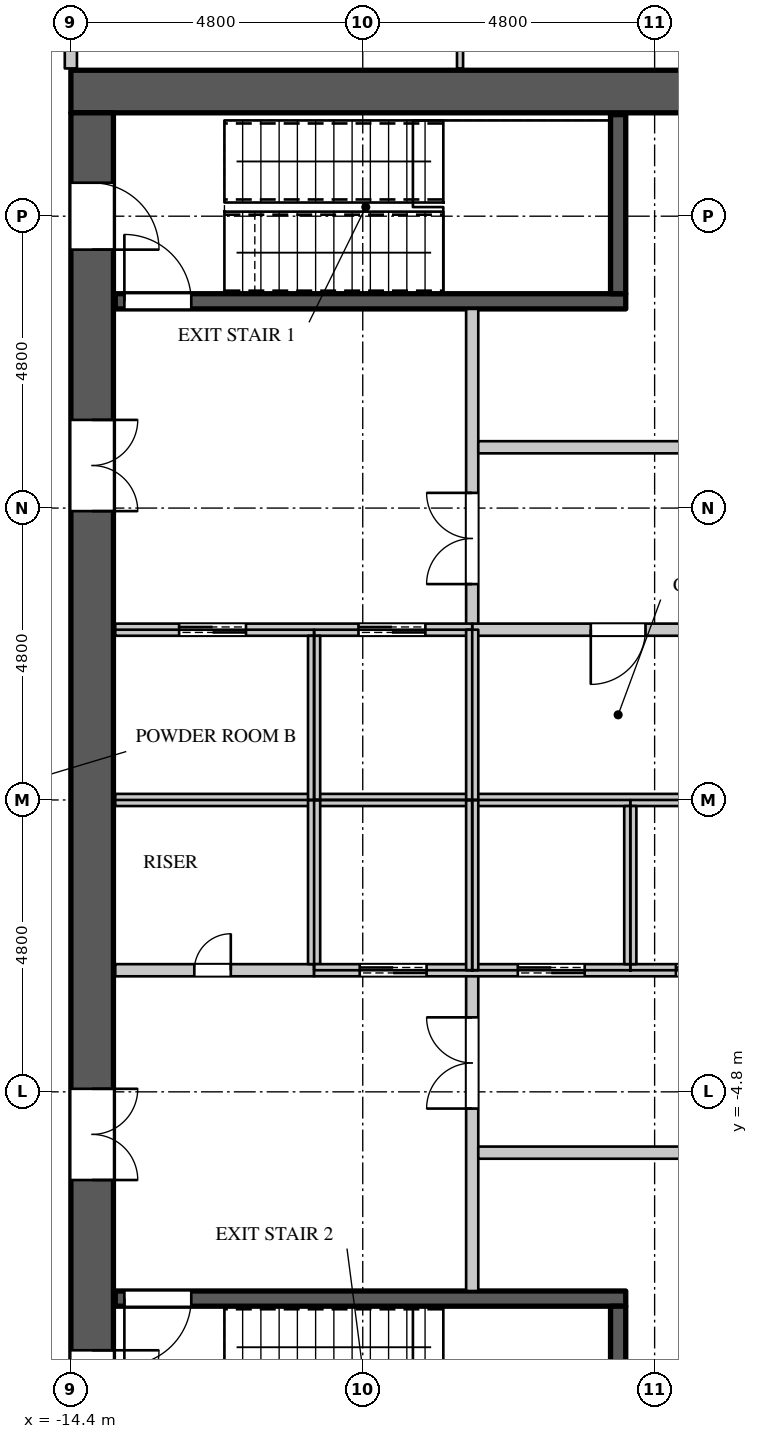
"""IFC4 building model, lengths in metres.
Left out: names, types, materials, properties, quantities, classifications, styles, units other than length and angle.
Written with IfcOpenShell. Run it as: python <this file> out.ifc"""

import sys

from ifc_helpers import new_model, si_unit, direction, frame, frame_2d, origin, place, context, subcontext, project, spatial, rectangle, extrude, element, fill, save


model = new_model("IFC4")
c1 = context("Model", 3, precision=1e-05, world=origin(), true_north=direction((0.0, 1.0)))
c2 = subcontext(c1, "Body", "Model", "MODEL_VIEW")
j1 = project(units=[si_unit("LENGTHUNIT", "METRE"), si_unit("PLANEANGLEUNIT", "RADIAN")], contexts=[c1])
p1 = place(None, origin())
s1 = spatial("IfcSite", under=j1, at=p1, CompositionType="ELEMENT")
p2 = place(p1, origin())
s2 = spatial("IfcBuilding", under=s1, at=p2, CompositionType="ELEMENT")
p3 = place(p2, frame((0.0, 0.0, 187.5)))
s3 = spatial("IfcBuildingStorey", under=s2, at=p3, CompositionType="ELEMENT", Elevation=187.5)
p4 = place(p3, frame((-14.4, 11.65, 0.0), z_axis=(0.0, 0.0, 1.0), x_axis=(1.0, 0.0, 0.0)))
e1 = element("IfcWall", 1, at=p4, inside=s3, PredefinedType="SHEAR", context=c2, shape_type="SweptSolid", body=[
    extrude(rectangle(XDim=28.8, YDim=0.7, at=frame_2d((14.4, 0.0))), origin(), (0.0, 0.0, 1.0), 4.2),
])
p5 = place(p3, frame((-14.05, -11.3, 0.0), z_axis=(0.0, 0.0, 1.0), x_axis=(0.0, 1.0, 0.0)))
e2 = element("IfcWall", 2, at=p5, inside=s3, PredefinedType="SHEAR", context=c2, shape_type="SweptSolid", body=[
    extrude(rectangle(XDim=22.6, YDim=0.7, at=frame_2d((11.3, 0.0))), origin(), (0.0, 0.0, 1.0), 4.2),
])
p6 = place(p5, frame((20.35, 0.0, 0.0)))
e3 = element("IfcOpeningElement", 3, at=p6, cuts=e2, PredefinedType="OPENING", context=c2, shape_type="SweptSolid", body=[
    extrude(rectangle(XDim=1.1, YDim=2.2, at=frame_2d((0.55, 1.1))), frame((0.0, 0.36, 0.0), z_axis=(0.0, -1.0, 0.0), x_axis=(1.0, 0.0, 0.0)), (0.0, 0.0, 1.0), 0.72),
])
p7 = place(p5, frame((1.15, 0.0, 0.0)))
e4 = element("IfcOpeningElement", 4, at=p7, cuts=e2, PredefinedType="OPENING", context=c2, shape_type="SweptSolid", body=[
    extrude(rectangle(XDim=1.1, YDim=2.2, at=frame_2d((0.55, 1.1))), frame((0.0, 0.36, 0.0), z_axis=(0.0, -1.0, 0.0), x_axis=(1.0, 0.0, 0.0)), (0.0, 0.0, 1.0), 0.72),
])
p8 = place(p5, frame((16.05, 0.0, 0.0)))
e5 = element("IfcOpeningElement", 5, at=p8, cuts=e2, PredefinedType="OPENING", context=c2, shape_type="SweptSolid", body=[
    extrude(rectangle(XDim=1.5, YDim=2.4, at=frame_2d((0.75, 1.2))), frame((0.0, 0.36, 0.0), z_axis=(0.0, -1.0, 0.0), x_axis=(1.0, 0.0, 0.0)), (0.0, 0.0, 1.0), 0.72),
])
p9 = place(p5, frame((5.05, 0.0, 0.0)))
e6 = element("IfcOpeningElement", 6, at=p9, cuts=e2, PredefinedType="OPENING", context=c2, shape_type="SweptSolid", body=[
    extrude(rectangle(XDim=1.5, YDim=2.4, at=frame_2d((0.75, 1.2))), frame((0.0, 0.36, 0.0), z_axis=(0.0, -1.0, 0.0), x_axis=(1.0, 0.0, 0.0)), (0.0, 0.0, 1.0), 0.72),
])
p10 = place(p3, frame((-14.4, 12.03, 0.0), z_axis=(0.0, 0.0, 1.0), x_axis=(0.0, 1.0, 0.0)))
e7 = element("IfcWall", 7, at=p10, inside=s3, PredefinedType="PARTITIONING", context=c2, shape_type="SweptSolid", body=[
    extrude(rectangle(XDim=2.27, YDim=0.2, at=frame_2d((1.135, 0.0))), origin(), (0.0, 0.0, 1.0), 3.95),
])
p11 = place(p3, frame((-7.8, -8.075, 0.0), z_axis=(0.0, 0.0, 1.0), x_axis=(0.0, 1.0, 0.0)))
e8 = element("IfcWall", 8, at=p11, inside=s3, PredefinedType="PARTITIONING", context=c2, shape_type="SweptSolid", body=[
    extrude(rectangle(XDim=5.275, YDim=0.2, at=frame_2d((2.637, 0.0))), origin(), (0.0, 0.0, 1.0), 3.95),
])
p12 = place(p11, frame((3.0, 0.0, 0.0)))
e9 = element("IfcOpeningElement", 9, at=p12, cuts=e8, PredefinedType="OPENING", context=c2, shape_type="SweptSolid", body=[
    extrude(rectangle(XDim=1.5, YDim=2.4, at=frame_2d((0.75, 1.2))), frame((0.0, 0.11, 0.0), z_axis=(0.0, -1.0, 0.0), x_axis=(1.0, 0.0, 0.0)), (0.0, 0.0, 1.0), 0.22),
])
p13 = place(p3, frame((-7.7, -5.8, 0.0), z_axis=(0.0, 0.0, 1.0), x_axis=(1.0, 0.0, 0.0)))
e10 = element("IfcWall", 10, at=p13, inside=s3, PredefinedType="PARTITIONING", context=c2, shape_type="SweptSolid", body=[
    extrude(rectangle(XDim=21.37, YDim=0.2, at=frame_2d((10.685, 0.0))), origin(), (0.0, 0.0, 1.0), 3.95),
])
p14 = place(p13, frame((5.35, 0.0, 0.0)))
e11 = element("IfcOpeningElement", 11, at=p14, cuts=e10, PredefinedType="OPENING", context=c2, shape_type="SweptSolid", body=[
    extrude(rectangle(XDim=0.9, YDim=2.2, at=frame_2d((0.45, 1.1))), frame((0.0, 0.11, 0.0), z_axis=(0.0, -1.0, 0.0), x_axis=(1.0, 0.0, 0.0)), (0.0, 0.0, 1.0), 0.22),
])
p15 = place(p13, frame((15.9, 0.0, 0.0)))
e12 = element("IfcOpeningElement", 12, at=p15, cuts=e10, PredefinedType="OPENING", context=c2, shape_type="SweptSolid", body=[
    extrude(rectangle(XDim=0.9, YDim=2.2, at=frame_2d((0.45, 1.1))), frame((0.0, 0.11, 0.0), z_axis=(0.0, -1.0, 0.0), x_axis=(1.0, 0.0, 0.0)), (0.0, 0.0, 1.0), 0.22),
])
p16 = place(p3, frame((-7.8, 2.8, 0.0), z_axis=(0.0, 0.0, 1.0), x_axis=(0.0, 1.0, 0.0)))
e13 = element("IfcWall", 13, at=p16, inside=s3, PredefinedType="PARTITIONING", context=c2, shape_type="SweptSolid", body=[
    extrude(rectangle(XDim=5.275, YDim=0.2, at=frame_2d((2.637, 0.0))), origin(), (0.0, 0.0, 1.0), 3.95),
])
p17 = place(p16, frame((0.75, 0.0, 0.0)))
e14 = element("IfcOpeningElement", 14, at=p17, cuts=e13, PredefinedType="OPENING", context=c2, shape_type="SweptSolid", body=[
    extrude(rectangle(XDim=1.5, YDim=2.4, at=frame_2d((0.75, 1.2))), frame((0.0, 0.11, 0.0), z_axis=(0.0, -1.0, 0.0), x_axis=(1.0, 0.0, 0.0)), (0.0, 0.0, 1.0), 0.22),
])
p18 = place(p3, frame((-7.7, 5.8, 0.0), z_axis=(0.0, 0.0, 1.0), x_axis=(1.0, 0.0, 0.0)))
e15 = element("IfcWall", 15, at=p18, inside=s3, PredefinedType="PARTITIONING", context=c2, shape_type="SweptSolid", body=[
    extrude(rectangle(XDim=8.12, YDim=0.2, at=frame_2d((4.06, 0.0))), origin(), (0.0, 0.0, 1.0), 3.95),
])
p19 = place(p18, frame((3.6, 0.0, 0.0)))
e16 = element("IfcOpeningElement", 16, at=p19, cuts=e15, PredefinedType="OPENING", context=c2, shape_type="SweptSolid", body=[
    extrude(rectangle(XDim=0.9, YDim=2.2, at=frame_2d((0.45, 1.1))), frame((0.0, 0.11, 0.0), z_axis=(0.0, -1.0, 0.0), x_axis=(1.0, 0.0, 0.0)), (0.0, 0.0, 1.0), 0.22),
])
p20 = place(p3, frame((-13.67, -2.8, 0.0), z_axis=(0.0, 0.0, 1.0), x_axis=(1.0, 0.0, 0.0)))
e17 = element("IfcWall", 17, at=p20, inside=s3, PredefinedType="PARTITIONING", context=c2, shape_type="SweptSolid", body=[
    extrude(rectangle(XDim=3.27, YDim=0.2, at=frame_2d((1.635, 0.0))), origin(), (0.0, 0.0, 1.0), 3.95),
])
p21 = place(p20, frame((1.3, 0.0, 0.0)))
e18 = element("IfcOpeningElement", 18, at=p21, cuts=e17, PredefinedType="OPENING", context=c2, shape_type="SweptSolid", body=[
    extrude(rectangle(XDim=0.6, YDim=2.0, at=frame_2d((0.3, 1.0))), frame((0.0, 0.11, 0.0), z_axis=(0.0, -1.0, 0.0), x_axis=(1.0, 0.0, 0.0)), (0.0, 0.0, 1.0), 0.22),
])
p22 = place(p3, frame((-7.8, 2.8, 0.0), z_axis=(0.0, 0.0, 1.0), x_axis=(1.0, 0.0, 0.0)))
e19 = element("IfcWall", 19, at=p22, inside=s3, PredefinedType="PARTITIONING", context=c2, shape_type="SweptSolid", body=[
    extrude(rectangle(XDim=4.82, YDim=0.2, at=frame_2d((2.41, 0.0))), origin(), (0.0, 0.0, 1.0), 3.95),
])
p23 = place(p22, frame((1.95, 0.0, 0.0)))
e20 = element("IfcOpeningElement", 20, at=p23, cuts=e19, PredefinedType="OPENING", context=c2, shape_type="SweptSolid", body=[
    extrude(rectangle(XDim=0.9, YDim=2.2, at=frame_2d((0.45, 1.1))), frame((0.0, 0.11, 0.0), z_axis=(0.0, -1.0, 0.0), x_axis=(1.0, 0.0, 0.0)), (0.0, 0.0, 1.0), 0.22),
])
p24 = place(p3, frame((-13.67, 0.0, 0.0), z_axis=(0.0, 0.0, 1.0), x_axis=(1.0, 0.0, 0.0)))
e21 = element("IfcWall", 21, at=p24, inside=s3, PredefinedType="PARTITIONING", context=c2, shape_type="SweptSolid", body=[
    extrude(rectangle(XDim=21.47, YDim=0.2, at=frame_2d((10.735, 0.0))), origin(), (0.0, 0.0, 1.0), 3.95),
])
p25 = place(p3, frame((-13.67, 2.8, 0.0), z_axis=(0.0, 0.0, 1.0), x_axis=(1.0, 0.0, 0.0)))
e22 = element("IfcWall", 22, at=p25, inside=s3, PredefinedType="PARTITIONING", context=c2, shape_type="SweptSolid", body=[
    extrude(rectangle(XDim=5.87, YDim=0.2, at=frame_2d((2.935, 0.0))), origin(), (0.0, 0.0, 1.0), 3.95),
])
p26 = place(p25, frame((1.05, 0.0, 0.0)))
e23 = element("IfcOpeningElement", 23, at=p26, cuts=e22, PredefinedType="OPENING", context=c2, shape_type="SweptSolid", body=[
    extrude(rectangle(XDim=1.1, YDim=2.2, at=frame_2d((0.55, 1.1))), frame((0.0, 0.11, 0.0), z_axis=(0.0, -1.0, 0.0), x_axis=(1.0, 0.0, 0.0)), (0.0, 0.0, 1.0), 0.22),
])
p27 = place(p25, frame((4.0, 0.0, 0.0)))
e24 = element("IfcOpeningElement", 24, at=p27, cuts=e22, PredefinedType="OPENING", context=c2, shape_type="SweptSolid", body=[
    extrude(rectangle(XDim=1.1, YDim=2.2, at=frame_2d((0.55, 1.1))), frame((0.0, 0.11, 0.0), z_axis=(0.0, -1.0, 0.0), x_axis=(1.0, 0.0, 0.0)), (0.0, 0.0, 1.0), 0.22),
])
p28 = place(p3, frame((-10.4, -2.7, 0.0), z_axis=(0.0, 0.0, 1.0), x_axis=(0.0, 1.0, 0.0)))
e25 = element("IfcWall", 25, at=p28, inside=s3, PredefinedType="PARTITIONING", context=c2, shape_type="SweptSolid", body=[
    extrude(rectangle(XDim=2.7, YDim=0.2, at=frame_2d((1.35, 0.0))), origin(), (0.0, 0.0, 1.0), 3.95),
])
p29 = place(p3, frame((-10.4, -2.8, 0.0), z_axis=(0.0, 0.0, 1.0), x_axis=(1.0, 0.0, 0.0)))
e26 = element("IfcWall", 26, at=p29, inside=s3, PredefinedType="PARTITIONING", context=c2, shape_type="SweptSolid", body=[
    extrude(rectangle(XDim=18.2, YDim=0.2, at=frame_2d((9.1, 0.0))), origin(), (0.0, 0.0, 1.0), 3.95),
])
p30 = place(p29, frame((0.75, 0.0, 0.0)))
e27 = element("IfcOpeningElement", 27, at=p30, cuts=e26, PredefinedType="OPENING", context=c2, shape_type="SweptSolid", body=[
    extrude(rectangle(XDim=1.1, YDim=2.2, at=frame_2d((0.55, 1.1))), frame((0.0, 0.11, 0.0), z_axis=(0.0, -1.0, 0.0), x_axis=(1.0, 0.0, 0.0)), (0.0, 0.0, 1.0), 0.22),
])
p31 = place(p29, frame((3.35, 0.0, 0.0)))
e28 = element("IfcOpeningElement", 28, at=p31, cuts=e26, PredefinedType="OPENING", context=c2, shape_type="SweptSolid", body=[
    extrude(rectangle(XDim=1.1, YDim=2.2, at=frame_2d((0.55, 1.1))), frame((0.0, 0.11, 0.0), z_axis=(0.0, -1.0, 0.0), x_axis=(1.0, 0.0, 0.0)), (0.0, 0.0, 1.0), 0.22),
])
p32 = place(p29, frame((5.95, 0.0, 0.0)))
e29 = element("IfcOpeningElement", 29, at=p32, cuts=e26, PredefinedType="OPENING", context=c2, shape_type="SweptSolid", body=[
    extrude(rectangle(XDim=1.1, YDim=2.2, at=frame_2d((0.55, 1.1))), frame((0.0, 0.11, 0.0), z_axis=(0.0, -1.0, 0.0), x_axis=(1.0, 0.0, 0.0)), (0.0, 0.0, 1.0), 0.22),
])
p33 = place(p29, frame((8.55, 0.0, 0.0)))
e30 = element("IfcOpeningElement", 30, at=p33, cuts=e26, PredefinedType="OPENING", context=c2, shape_type="SweptSolid", body=[
    extrude(rectangle(XDim=1.1, YDim=2.2, at=frame_2d((0.55, 1.1))), frame((0.0, 0.11, 0.0), z_axis=(0.0, -1.0, 0.0), x_axis=(1.0, 0.0, 0.0)), (0.0, 0.0, 1.0), 0.22),
])
p34 = place(p29, frame((11.15, 0.0, 0.0)))
e31 = element("IfcOpeningElement", 31, at=p34, cuts=e26, PredefinedType="OPENING", context=c2, shape_type="SweptSolid", body=[
    extrude(rectangle(XDim=1.1, YDim=2.2, at=frame_2d((0.55, 1.1))), frame((0.0, 0.11, 0.0), z_axis=(0.0, -1.0, 0.0), x_axis=(1.0, 0.0, 0.0)), (0.0, 0.0, 1.0), 0.22),
])
p35 = place(p29, frame((13.75, 0.0, 0.0)))
e32 = element("IfcOpeningElement", 32, at=p35, cuts=e26, PredefinedType="OPENING", context=c2, shape_type="SweptSolid", body=[
    extrude(rectangle(XDim=1.1, YDim=2.2, at=frame_2d((0.55, 1.1))), frame((0.0, 0.11, 0.0), z_axis=(0.0, -1.0, 0.0), x_axis=(1.0, 0.0, 0.0)), (0.0, 0.0, 1.0), 0.22),
])
p36 = place(p29, frame((16.35, 0.0, 0.0)))
e33 = element("IfcOpeningElement", 33, at=p36, cuts=e26, PredefinedType="OPENING", context=c2, shape_type="SweptSolid", body=[
    extrude(rectangle(XDim=1.1, YDim=2.2, at=frame_2d((0.55, 1.1))), frame((0.0, 0.11, 0.0), z_axis=(0.0, -1.0, 0.0), x_axis=(1.0, 0.0, 0.0)), (0.0, 0.0, 1.0), 0.22),
])
p37 = place(p3, frame((-10.4, 0.0, 0.0), z_axis=(0.0, 0.0, 1.0), x_axis=(0.0, 1.0, 0.0)))
e34 = element("IfcWall", 34, at=p37, inside=s3, PredefinedType="PARTITIONING", context=c2, shape_type="SweptSolid", body=[
    extrude(rectangle(XDim=2.7, YDim=0.2, at=frame_2d((1.35, 0.0))), origin(), (0.0, 0.0, 1.0), 3.95),
])
for number, where, z_axis, x_axis in (
    (35, (-7.8, -2.8, 0.0), (0.0, 0.0, 1.0), (0.0, 1.0, 0.0)),
    (36, (-7.8, 0.0, 0.0), (0.0, 0.0, 1.0), (0.0, 1.0, 0.0)),
):
    element("IfcWall", number, at=place(p3, frame(where, z_axis=z_axis, x_axis=x_axis)), inside=s3, PredefinedType="PARTITIONING", context=c2, shape_type="SweptSolid", body=[
        extrude(rectangle(XDim=2.8, YDim=0.2, at=frame_2d((1.4, 0.0))), origin(), (0.0, 0.0, 1.0), 3.95),
    ])
p38 = place(p3, frame((-5.2, -2.7, 0.0), z_axis=(0.0, 0.0, 1.0), x_axis=(0.0, 1.0, 0.0)))
e37 = element("IfcWall", 37, at=p38, inside=s3, PredefinedType="PARTITIONING", context=c2, shape_type="SweptSolid", body=[
    extrude(rectangle(XDim=2.6, YDim=0.2, at=frame_2d((1.3, 0.0))), origin(), (0.0, 0.0, 1.0), 3.95),
])
p39 = place(p3, frame((-13.67, -8.2, 0.0), z_axis=(0.0, 0.0, 1.0), x_axis=(1.0, 0.0, 0.0)))
e38 = element("IfcWall", 38, at=p39, inside=s3, PredefinedType="SHEAR", context=c2, shape_type="SweptSolid", body=[
    extrude(rectangle(XDim=8.395, YDim=0.25, at=frame_2d((4.198, 0.0))), origin(), (0.0, 0.0, 1.0), 3.95),
])
p40 = place(p39, frame((0.15, 0.0, 0.0)))
e39 = element("IfcOpeningElement", 39, at=p40, cuts=e38, PredefinedType="OPENING", context=c2, shape_type="SweptSolid", body=[
    extrude(rectangle(XDim=1.1, YDim=2.2, at=frame_2d((0.55, 1.1))), frame((0.0, 0.135, 0.0), z_axis=(0.0, -1.0, 0.0), x_axis=(1.0, 0.0, 0.0)), (0.0, 0.0, 1.0), 0.27),
])
p41 = place(p3, frame((-13.67, 8.2, 0.0), z_axis=(0.0, 0.0, 1.0), x_axis=(1.0, 0.0, 0.0)))
e40 = element("IfcWall", 40, at=p41, inside=s3, PredefinedType="SHEAR", context=c2, shape_type="SweptSolid", body=[
    extrude(rectangle(XDim=8.395, YDim=0.25, at=frame_2d((4.198, 0.0))), origin(), (0.0, 0.0, 1.0), 3.95),
])
p42 = place(p41, frame((0.15, 0.0, 0.0)))
e41 = element("IfcOpeningElement", 41, at=p42, cuts=e40, PredefinedType="OPENING", context=c2, shape_type="SweptSolid", body=[
    extrude(rectangle(XDim=1.1, YDim=2.2, at=frame_2d((0.55, 1.1))), frame((0.0, 0.135, 0.0), z_axis=(0.0, -1.0, 0.0), x_axis=(1.0, 0.0, 0.0)), (0.0, 0.0, 1.0), 0.27),
])
for number, where, z_axis, x_axis in (
    (42, (-5.4, -11.27, 0.0), (0.0, 0.0, 1.0), (0.0, 1.0, 0.0)),
    (43, (-5.4, 8.325, 0.0), (0.0, 0.0, 1.0), (0.0, 1.0, 0.0)),
):
    element("IfcWall", number, at=place(p3, frame(where, z_axis=z_axis, x_axis=x_axis)), inside=s3, PredefinedType="SHEAR", context=c2, shape_type="SweptSolid", body=[
        extrude(rectangle(XDim=2.945, YDim=0.25, at=frame_2d((1.473, 0.0))), origin(), (0.0, 0.0, 1.0), 3.95),
    ])
p43 = place(p3, frame((-8.0, 12.03, 0.0), z_axis=(0.0, 0.0, 1.0), x_axis=(0.0, 1.0, 0.0)))
e44 = element("IfcWall", 44, at=p43, inside=s3, PredefinedType="PARTITIONING", context=c2, shape_type="SweptSolid", body=[
    extrude(rectangle(XDim=4.595, YDim=0.1, at=frame_2d((2.297, 0.0))), origin(), (0.0, 0.0, 1.0), 3.95),
])
p44 = place(p21, origin())
e45 = element("IfcDoor", 45, at=p44, inside=s3, OperationType="SINGLE_SWING_RIGHT", PredefinedType="DOOR", context=c2, shape_type="SweptSolid", body=[
    extrude(rectangle(XDim=0.6, YDim=2.0, at=frame_2d((0.3, 1.0))), frame((0.0, 0.025, 0.0), z_axis=(0.0, -1.0, 0.0), x_axis=(1.0, 0.0, 0.0)), (0.0, 0.0, 1.0), 0.05),
])
fill(e18, e45)
p45 = place(p23, origin())
e46 = element("IfcDoor", 46, at=p45, inside=s3, OperationType="SINGLE_SWING_RIGHT", PredefinedType="DOOR", context=c2, shape_type="SweptSolid", body=[
    extrude(rectangle(XDim=0.9, YDim=2.2, at=frame_2d((0.45, 1.1))), frame((0.0, 0.025, 0.0), z_axis=(0.0, -1.0, 0.0), x_axis=(1.0, 0.0, 0.0)), (0.0, 0.0, 1.0), 0.05),
])
fill(e20, e46)
p46 = place(p26, origin())
e47 = element("IfcDoor", 47, at=p46, inside=s3, OperationType="DOUBLE_DOOR_SLIDING", PredefinedType="DOOR", context=c2, shape_type="SweptSolid", body=[
    extrude(rectangle(XDim=1.1, YDim=2.2, at=frame_2d((0.55, 1.1))), frame((0.0, 0.025, 0.0), z_axis=(0.0, -1.0, 0.0), x_axis=(1.0, 0.0, 0.0)), (0.0, 0.0, 1.0), 0.05),
])
fill(e23, e47)
p47 = place(p27, origin())
e48 = element("IfcDoor", 48, at=p47, inside=s3, OperationType="DOUBLE_DOOR_SLIDING", PredefinedType="DOOR", context=c2, shape_type="SweptSolid", body=[
    extrude(rectangle(XDim=1.1, YDim=2.2, at=frame_2d((0.55, 1.1))), frame((0.0, 0.025, 0.0), z_axis=(0.0, -1.0, 0.0), x_axis=(1.0, 0.0, 0.0)), (0.0, 0.0, 1.0), 0.05),
])
fill(e24, e48)
p48 = place(p30, origin())
e49 = element("IfcDoor", 49, at=p48, inside=s3, OperationType="DOUBLE_DOOR_SLIDING", PredefinedType="DOOR", context=c2, shape_type="SweptSolid", body=[
    extrude(rectangle(XDim=1.1, YDim=2.2, at=frame_2d((0.55, 1.1))), frame((0.0, 0.025, 0.0), z_axis=(0.0, -1.0, 0.0), x_axis=(1.0, 0.0, 0.0)), (0.0, 0.0, 1.0), 0.05),
])
fill(e27, e49)
p49 = place(p31, origin())
e50 = element("IfcDoor", 50, at=p49, inside=s3, OperationType="DOUBLE_DOOR_SLIDING", PredefinedType="DOOR", context=c2, shape_type="SweptSolid", body=[
    extrude(rectangle(XDim=1.1, YDim=2.2, at=frame_2d((0.55, 1.1))), frame((0.0, 0.025, 0.0), z_axis=(0.0, -1.0, 0.0), x_axis=(1.0, 0.0, 0.0)), (0.0, 0.0, 1.0), 0.05),
])
fill(e28, e50)
p50 = place(p32, origin())
e51 = element("IfcDoor", 51, at=p50, inside=s3, OperationType="DOUBLE_DOOR_SLIDING", PredefinedType="DOOR", context=c2, shape_type="SweptSolid", body=[
    extrude(rectangle(XDim=1.1, YDim=2.2, at=frame_2d((0.55, 1.1))), frame((0.0, 0.025, 0.0), z_axis=(0.0, -1.0, 0.0), x_axis=(1.0, 0.0, 0.0)), (0.0, 0.0, 1.0), 0.05),
])
fill(e29, e51)
p51 = place(p42, origin())
e52 = element("IfcDoor", 52, at=p51, inside=s3, OperationType="SINGLE_SWING_LEFT", PredefinedType="DOOR", context=c2, shape_type="SweptSolid", body=[
    extrude(rectangle(XDim=1.1, YDim=2.2, at=frame_2d((0.55, 1.1))), frame((0.0, 0.025, 0.0), z_axis=(0.0, -1.0, 0.0), x_axis=(1.0, 0.0, 0.0)), (0.0, 0.0, 1.0), 0.05),
])
fill(e41, e52)
p52 = place(p40, origin())
e53 = element("IfcDoor", 53, at=p52, inside=s3, OperationType="SINGLE_SWING_RIGHT", PredefinedType="DOOR", context=c2, shape_type="SweptSolid", body=[
    extrude(rectangle(XDim=1.1, YDim=2.2, at=frame_2d((0.55, 1.1))), frame((0.0, 0.025, 0.0), z_axis=(0.0, -1.0, 0.0), x_axis=(1.0, 0.0, 0.0)), (0.0, 0.0, 1.0), 0.05),
])
fill(e39, e53)
p53 = place(p17, origin())
e54 = element("IfcDoor", 54, at=p53, inside=s3, OperationType="DOUBLE_DOOR_SINGLE_SWING", PredefinedType="DOOR", context=c2, shape_type="SweptSolid", body=[
    extrude(rectangle(XDim=1.5, YDim=2.4, at=frame_2d((0.75, 1.2))), frame((0.0, 0.025, 0.0), z_axis=(0.0, -1.0, 0.0), x_axis=(1.0, 0.0, 0.0)), (0.0, 0.0, 1.0), 0.05),
])
fill(e14, e54)
p54 = place(p12, origin())
e55 = element("IfcDoor", 55, at=p54, inside=s3, OperationType="DOUBLE_DOOR_SINGLE_SWING", PredefinedType="DOOR", context=c2, shape_type="SweptSolid", body=[
    extrude(rectangle(XDim=1.5, YDim=2.4, at=frame_2d((0.75, 1.2))), frame((0.0, 0.025, 0.0), z_axis=(0.0, -1.0, 0.0), x_axis=(1.0, 0.0, 0.0)), (0.0, 0.0, 1.0), 0.05),
])
fill(e9, e55)
p55 = place(p6, origin())
e56 = element("IfcDoor", 56, at=p55, inside=s3, OperationType="SINGLE_SWING_RIGHT", PredefinedType="DOOR", context=c2, shape_type="SweptSolid", body=[
    extrude(rectangle(XDim=1.1, YDim=2.2, at=frame_2d((0.55, 1.1))), frame((0.0, -0.295, 0.0), z_axis=(0.0, -1.0, 0.0), x_axis=(1.0, 0.0, 0.0)), (0.0, 0.0, 1.0), 0.05),
])
fill(e3, e56)
p56 = place(p7, origin())
e57 = element("IfcDoor", 57, at=p56, inside=s3, OperationType="SINGLE_SWING_LEFT", PredefinedType="DOOR", context=c2, shape_type="SweptSolid", body=[
    extrude(rectangle(XDim=1.1, YDim=2.2, at=frame_2d((0.55, 1.1))), frame((0.0, -0.295, 0.0), z_axis=(0.0, -1.0, 0.0), x_axis=(1.0, 0.0, 0.0)), (0.0, 0.0, 1.0), 0.05),
])
fill(e4, e57)
p57 = place(p8, origin())
e58 = element("IfcDoor", 58, at=p57, inside=s3, OperationType="DOUBLE_DOOR_SINGLE_SWING", PredefinedType="DOOR", context=c2, shape_type="SweptSolid", body=[
    extrude(rectangle(XDim=1.5, YDim=2.4, at=frame_2d((0.75, 1.2))), frame((0.0, -0.295, 0.0), z_axis=(0.0, -1.0, 0.0), x_axis=(1.0, 0.0, 0.0)), (0.0, 0.0, 1.0), 0.05),
])
fill(e5, e58)
p58 = place(p9, origin())
e59 = element("IfcDoor", 59, at=p58, inside=s3, OperationType="DOUBLE_DOOR_SINGLE_SWING", PredefinedType="DOOR", context=c2, shape_type="SweptSolid", body=[
    extrude(rectangle(XDim=1.5, YDim=2.4, at=frame_2d((0.75, 1.2))), frame((0.0, -0.295, 0.0), z_axis=(0.0, -1.0, 0.0), x_axis=(1.0, 0.0, 0.0)), (0.0, 0.0, 1.0), 0.05),
])
fill(e6, e59)
save(model, sys.argv[1])
